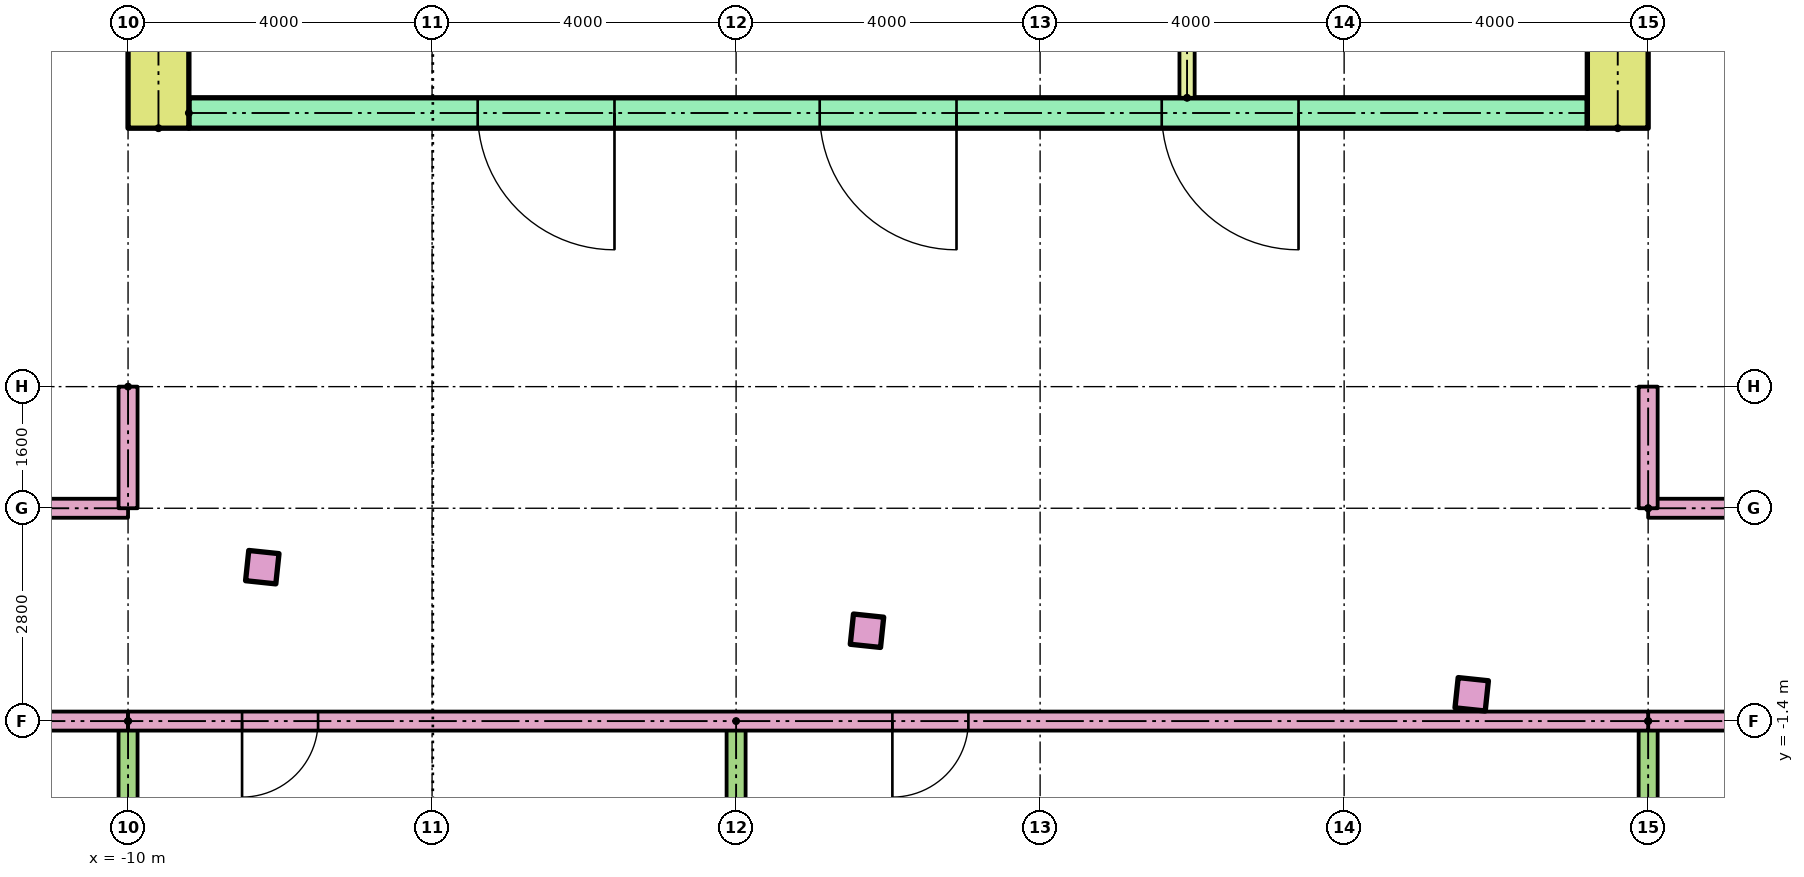
"""IFC4 building model, lengths in metres.
Left out: names, types, materials, properties, quantities, classifications, styles, units other than length and angle.
Written with IfcOpenShell. Run it as: python <this file> out.ifc"""

import sys

from ifc_helpers import new_model, si_unit, direction, frame, frame_2d, origin, origin_2d, place, context, subcontext, project, spatial, rectangle, extrude, element, fill, save


model = new_model("IFC4")
c1 = context("Model", 3, precision=1e-05, world=origin(), true_north=direction((0.0, 1.0)))
c2 = subcontext(c1, "Body", "Model", "MODEL_VIEW")
j1 = project(units=[si_unit("LENGTHUNIT", "METRE"), si_unit("PLANEANGLEUNIT", "RADIAN")], contexts=[c1])
p1 = place(None, origin())
s1 = spatial("IfcSite", under=j1, at=p1, CompositionType="ELEMENT")
p2 = place(p1, origin())
s2 = spatial("IfcBuilding", under=s1, at=p2, CompositionType="ELEMENT")
p3 = place(p2, frame((0.0, 0.0, 294.9)))
s3 = spatial("IfcBuildingStorey", under=s2, at=p3, CompositionType="ELEMENT", Elevation=294.9)
for number, where, z_axis, x_axis in (
    (1, (-8.234, 0.625, 0.0), (0.0, 0.0, 1.0), (0.995, -0.105, 0.0)),
    (2, (-0.278, -0.211, 0.0), (0.0, 0.0, 1.0), (0.995, -0.105, 0.0)),
    (3, (7.678, -1.048, 0.0), (0.0, 0.0, 1.0), (0.995, -0.105, 0.0)),
):
    element("IfcColumn", number, at=place(p3, frame(where, z_axis=z_axis, x_axis=x_axis)), inside=s3, PredefinedType="COLUMN", context=c2, shape_type="SweptSolid", body=[
        extrude(rectangle(XDim=0.4, YDim=0.4, at=origin_2d()), origin(), (0.0, 0.0, 1.0), 3.4),
    ])
for number, where, z_axis, x_axis in (
    (4, (-9.6, 6.4, 0.0), (0.0, 0.0, 1.0), (0.0, 1.0, 0.0)),
    (5, (9.6, 6.4, 0.0), (0.0, 0.0, 1.0), (0.0, 1.0, 0.0)),
):
    element("IfcWall", number, at=place(p3, frame(where, z_axis=z_axis, x_axis=x_axis)), inside=s3, PredefinedType="SHEAR", context=c2, shape_type="SweptSolid", body=[
        extrude(rectangle(XDim=13.6, YDim=0.8, at=frame_2d((6.8, 0.0))), origin(), (0.0, 0.0, 1.0), 3.12),
    ])
p4 = place(p3, frame((-9.2, 6.6, 0.0)))
e6 = element("IfcWall", 6, at=p4, inside=s3, PredefinedType="SHEAR", context=c2, shape_type="SweptSolid", body=[
    extrude(rectangle(XDim=18.4, YDim=0.4, at=frame_2d((9.2, 0.0))), origin(), (0.0, 0.0, 1.0), 3.12),
])
p5 = place(p4, frame((8.3, 0.0, 0.0)))
e7 = element("IfcOpeningElement", 7, at=p5, cuts=e6, PredefinedType="OPENING", context=c2, shape_type="SweptSolid", body=[
    extrude(rectangle(XDim=1.8, YDim=2.1, at=frame_2d((0.9, 1.05))), frame((0.0, 0.21, 0.0), z_axis=(0.0, -1.0, 0.0), x_axis=(1.0, 0.0, 0.0)), (0.0, 0.0, 1.0), 0.42),
])
p6 = place(p4, frame((3.8, 0.0, 0.0)))
e8 = element("IfcOpeningElement", 8, at=p6, cuts=e6, PredefinedType="OPENING", context=c2, shape_type="SweptSolid", body=[
    extrude(rectangle(XDim=1.8, YDim=2.1, at=frame_2d((0.9, 1.05))), frame((0.0, 0.21, 0.0), z_axis=(0.0, -1.0, 0.0), x_axis=(1.0, 0.0, 0.0)), (0.0, 0.0, 1.0), 0.42),
])
p7 = place(p4, frame((12.8, 0.0, 0.0)))
e9 = element("IfcOpeningElement", 9, at=p7, cuts=e6, PredefinedType="OPENING", context=c2, shape_type="SweptSolid", body=[
    extrude(rectangle(XDim=1.8, YDim=2.1, at=frame_2d((0.9, 1.05))), frame((0.0, 0.21, 0.0), z_axis=(0.0, -1.0, 0.0), x_axis=(1.0, 0.0, 0.0)), (0.0, 0.0, 1.0), 0.42),
])
p8 = place(p3, frame((3.933, 6.8, 0.0), z_axis=(0.0, 0.0, 1.0), x_axis=(0.0, 1.0, 0.0)))
e10 = element("IfcWall", 10, at=p8, inside=s3, PredefinedType="PARTITIONING", context=c2, shape_type="SweptSolid", body=[
    extrude(rectangle(XDim=3.3, YDim=0.2, at=frame_2d((1.65, 0.0))), origin(), (0.0, 0.0, 1.0), 3.12),
])
p9 = place(p8, frame((1.1, 0.0, 0.0)))
e11 = element("IfcOpeningElement", 11, at=p9, cuts=e10, PredefinedType="OPENING", context=c2, shape_type="SweptSolid", body=[
    extrude(rectangle(XDim=1.1, YDim=2.1, at=frame_2d((0.55, 1.05))), frame((0.0, 0.11, 0.0), z_axis=(0.0, -1.0, 0.0), x_axis=(1.0, 0.0, 0.0)), (0.0, 0.0, 1.0), 0.22),
])
p10 = place(p3, frame((-10.0, -1.4, 0.0), z_axis=(0.0, 0.0, 1.0), x_axis=(-1.0, 0.0, 0.0)))
e12 = element("IfcWall", 12, at=p10, inside=s3, PredefinedType="PARTITIONING", context=c2, shape_type="SweptSolid", body=[
    extrude(rectangle(XDim=12.0, YDim=0.25, at=frame_2d((6.0, 0.0))), origin(), (0.0, 0.0, 1.0), 2.6),
])
p11 = place(p10, frame((1.5, 0.0, 0.0)))
e13 = element("IfcOpeningElement", 13, at=p11, cuts=e12, PredefinedType="OPENING", context=c2, shape_type="SweptSolid", body=[
    extrude(rectangle(XDim=1.0, YDim=2.1, at=frame_2d((0.5, 1.05))), frame((0.0, 0.135, 0.0), z_axis=(0.0, -1.0, 0.0), x_axis=(1.0, 0.0, 0.0)), (0.0, 0.0, 1.0), 0.27),
])
p12 = place(p10, frame((8.3, 0.0, 0.0)))
e14 = element("IfcOpeningElement", 14, at=p12, cuts=e12, PredefinedType="OPENING", context=c2, shape_type="SweptSolid", body=[
    extrude(rectangle(XDim=1.0, YDim=2.1, at=frame_2d((0.5, 1.05))), frame((0.0, 0.135, 0.0), z_axis=(0.0, -1.0, 0.0), x_axis=(1.0, 0.0, 0.0)), (0.0, 0.0, 1.0), 0.27),
])
p13 = place(p3, frame((-10.0, -1.4, 0.0), z_axis=(0.0, 0.0, 1.0), x_axis=(0.0, -1.0, 0.0)))
e15 = element("IfcWall", 15, at=p13, inside=s3, PredefinedType="PARTITIONING", context=c2, shape_type="SweptSolid", body=[
    extrude(rectangle(XDim=12.491, YDim=0.25, at=frame_2d((6.246, 0.0))), origin(), (0.0, 0.0, 1.0), 2.6),
])
p14 = place(p3, frame((-22.0, 1.4, 0.0)))
e16 = element("IfcWall", 16, at=p14, inside=s3, PredefinedType="PARTITIONING", context=c2, shape_type="SweptSolid", body=[
    extrude(rectangle(XDim=12.0, YDim=0.25, at=frame_2d((6.0, 0.0))), origin(), (0.0, 0.0, 1.0), 2.6),
])
p15 = place(p14, frame((9.5, 0.0, 0.0)))
e17 = element("IfcOpeningElement", 17, at=p15, cuts=e16, PredefinedType="OPENING", context=c2, shape_type="SweptSolid", body=[
    extrude(rectangle(XDim=1.0, YDim=2.1, at=frame_2d((0.5, 1.05))), frame((0.0, 0.135, 0.0), z_axis=(0.0, -1.0, 0.0), x_axis=(1.0, 0.0, 0.0)), (0.0, 0.0, 1.0), 0.27),
])
p16 = place(p3, frame((25.0, -1.4, 0.0), z_axis=(0.0, 0.0, 1.0), x_axis=(-1.0, 0.0, 0.0)))
e18 = element("IfcWall", 18, at=p16, inside=s3, PredefinedType="PARTITIONING", context=c2, shape_type="SweptSolid", body=[
    extrude(rectangle(XDim=15.0, YDim=0.25, at=frame_2d((7.5, 0.0))), origin(), (0.0, 0.0, 1.0), 2.6),
])
p17 = place(p16, frame((12.5, 0.0, 0.0)))
e19 = element("IfcOpeningElement", 19, at=p17, cuts=e18, PredefinedType="OPENING", context=c2, shape_type="SweptSolid", body=[
    extrude(rectangle(XDim=1.0, YDim=2.1, at=frame_2d((0.5, 1.05))), frame((0.0, 0.135, 0.0), z_axis=(0.0, -1.0, 0.0), x_axis=(1.0, 0.0, 0.0)), (0.0, 0.0, 1.0), 0.27),
])
p18 = place(p16, frame((1.743, 0.0, 0.0)))
e20 = element("IfcOpeningElement", 20, at=p18, cuts=e18, PredefinedType="OPENING", context=c2, shape_type="SweptSolid", body=[
    extrude(rectangle(XDim=1.0, YDim=2.1, at=frame_2d((0.5, 1.05))), frame((0.0, 0.135, 0.0), z_axis=(0.0, -1.0, 0.0), x_axis=(1.0, 0.0, 0.0)), (0.0, 0.0, 1.0), 0.27),
])
p19 = place(p3, frame((10.0, -1.4, 0.0), z_axis=(0.0, 0.0, 1.0), x_axis=(0.0, -1.0, 0.0)))
e21 = element("IfcWall", 21, at=p19, inside=s3, PredefinedType="PARTITIONING", context=c2, shape_type="SweptSolid", body=[
    extrude(rectangle(XDim=14.593, YDim=0.25, at=frame_2d((7.297, 0.0))), origin(), (0.0, 0.0, 1.0), 2.6),
])
p20 = place(p3, frame((10.0, 1.4, 0.0)))
e22 = element("IfcWall", 22, at=p20, inside=s3, PredefinedType="PARTITIONING", context=c2, shape_type="SweptSolid", body=[
    extrude(rectangle(XDim=15.0, YDim=0.25, at=frame_2d((7.5, 0.0))), origin(), (0.0, 0.0, 1.0), 2.6),
])
p21 = place(p20, frame((1.5, 0.0, 0.0)))
e23 = element("IfcOpeningElement", 23, at=p21, cuts=e22, PredefinedType="OPENING", context=c2, shape_type="SweptSolid", body=[
    extrude(rectangle(XDim=1.0, YDim=2.1, at=frame_2d((0.5, 1.05))), frame((0.0, 0.135, 0.0), z_axis=(0.0, -1.0, 0.0), x_axis=(1.0, 0.0, 0.0)), (0.0, 0.0, 1.0), 0.27),
])
p22 = place(p20, frame((9.5, 0.0, 0.0)))
e24 = element("IfcOpeningElement", 24, at=p22, cuts=e22, PredefinedType="OPENING", context=c2, shape_type="SweptSolid", body=[
    extrude(rectangle(XDim=1.0, YDim=2.1, at=frame_2d((0.5, 1.05))), frame((0.0, 0.135, 0.0), z_axis=(0.0, -1.0, 0.0), x_axis=(1.0, 0.0, 0.0)), (0.0, 0.0, 1.0), 0.27),
])
p23 = place(p3, frame((-2.0, -1.4, 0.0), z_axis=(0.0, 0.0, 1.0), x_axis=(0.0, -1.0, 0.0)))
e25 = element("IfcWall", 25, at=p23, inside=s3, PredefinedType="PARTITIONING", context=c2, shape_type="SweptSolid", body=[
    extrude(rectangle(XDim=13.332, YDim=0.25, at=frame_2d((6.666, 0.0))), origin(), (0.0, 0.0, 1.0), 2.6),
])
p24 = place(p3, frame((10.0, -1.4, 0.0), z_axis=(0.0, 0.0, 1.0), x_axis=(-1.0, 0.0, 0.0)))
e26 = element("IfcWall", 26, at=p24, inside=s3, PredefinedType="PARTITIONING", context=c2, shape_type="SweptSolid", body=[
    extrude(rectangle(XDim=20.0, YDim=0.25, at=frame_2d((10.0, 0.0))), origin(), (0.0, 0.0, 1.0), 2.6),
])
p25 = place(p24, frame((17.5, 0.0, 0.0)))
e27 = element("IfcOpeningElement", 27, at=p25, cuts=e26, PredefinedType="OPENING", context=c2, shape_type="SweptSolid", body=[
    extrude(rectangle(XDim=1.0, YDim=2.1, at=frame_2d((0.5, 1.05))), frame((0.0, 0.135, 0.0), z_axis=(0.0, -1.0, 0.0), x_axis=(1.0, 0.0, 0.0)), (0.0, 0.0, 1.0), 0.27),
])
p26 = place(p24, frame((8.944, 0.0, 0.0)))
e28 = element("IfcOpeningElement", 28, at=p26, cuts=e26, PredefinedType="OPENING", context=c2, shape_type="SweptSolid", body=[
    extrude(rectangle(XDim=1.0, YDim=2.1, at=frame_2d((0.5, 1.05))), frame((0.0, 0.135, 0.0), z_axis=(0.0, -1.0, 0.0), x_axis=(1.0, 0.0, 0.0)), (0.0, 0.0, 1.0), 0.27),
])
for number, where, z_axis, x_axis in (
    (29, (-10.0, 3.0, 0.0), (0.0, 0.0, 1.0), (0.0, -1.0, 0.0)),
    (30, (10.0, 1.4, 0.0), (0.0, 0.0, 1.0), (0.0, 1.0, 0.0)),
):
    element("IfcWall", number, at=place(p3, frame(where, z_axis=z_axis, x_axis=x_axis)), inside=s3, PredefinedType="PARTITIONING", context=c2, shape_type="SweptSolid", body=[
        extrude(rectangle(XDim=1.6, YDim=0.25, at=frame_2d((0.8, 0.0))), origin(), (0.0, 0.0, 1.0), 2.6),
    ])
p27 = place(p5, frame((1.8, 0.0, 0.0), z_axis=(0.0, 0.0, 1.0), x_axis=(-1.0, 0.0, 0.0)))
e31 = element("IfcDoor", 31, at=p27, inside=s3, OperationType="DOUBLE_DOOR_SINGLE_SWING", PredefinedType="DOOR", context=c2, shape_type="SweptSolid", body=[
    extrude(rectangle(XDim=1.8, YDim=2.1, at=frame_2d((0.9, 1.05))), frame((0.0, 0.025, 0.0), z_axis=(0.0, -1.0, 0.0), x_axis=(1.0, 0.0, 0.0)), (0.0, 0.0, 1.0), 0.05),
])
fill(e7, e31)
p28 = place(p6, frame((1.8, 0.0, 0.0), z_axis=(0.0, 0.0, 1.0), x_axis=(-1.0, 0.0, 0.0)))
e32 = element("IfcDoor", 32, at=p28, inside=s3, OperationType="DOUBLE_DOOR_SINGLE_SWING", PredefinedType="DOOR", context=c2, shape_type="SweptSolid", body=[
    extrude(rectangle(XDim=1.8, YDim=2.1, at=frame_2d((0.9, 1.05))), frame((0.0, 0.025, 0.0), z_axis=(0.0, -1.0, 0.0), x_axis=(1.0, 0.0, 0.0)), (0.0, 0.0, 1.0), 0.05),
])
fill(e8, e32)
p29 = place(p7, frame((1.8, 0.0, 0.0), z_axis=(0.0, 0.0, 1.0), x_axis=(-1.0, 0.0, 0.0)))
e33 = element("IfcDoor", 33, at=p29, inside=s3, OperationType="DOUBLE_DOOR_SINGLE_SWING", PredefinedType="DOOR", context=c2, shape_type="SweptSolid", body=[
    extrude(rectangle(XDim=1.8, YDim=2.1, at=frame_2d((0.9, 1.05))), frame((0.0, 0.025, 0.0), z_axis=(0.0, -1.0, 0.0), x_axis=(1.0, 0.0, 0.0)), (0.0, 0.0, 1.0), 0.05),
])
fill(e9, e33)
p30 = place(p25, origin())
e34 = element("IfcDoor", 34, at=p30, inside=s3, OperationType="SINGLE_SWING_RIGHT", PredefinedType="DOOR", context=c2, shape_type="SweptSolid", body=[
    extrude(rectangle(XDim=1.0, YDim=2.1, at=frame_2d((0.5, 1.05))), frame((0.0, 0.025, 0.0), z_axis=(0.0, -1.0, 0.0), x_axis=(1.0, 0.0, 0.0)), (0.0, 0.0, 1.0), 0.05),
])
fill(e27, e34)
p31 = place(p26, origin())
e35 = element("IfcDoor", 35, at=p31, inside=s3, OperationType="SINGLE_SWING_RIGHT", PredefinedType="DOOR", context=c2, shape_type="SweptSolid", body=[
    extrude(rectangle(XDim=1.0, YDim=2.1, at=frame_2d((0.5, 1.05))), frame((0.0, 0.025, 0.0), z_axis=(0.0, -1.0, 0.0), x_axis=(1.0, 0.0, 0.0)), (0.0, 0.0, 1.0), 0.05),
])
fill(e28, e35)
save(model, sys.argv[1])
